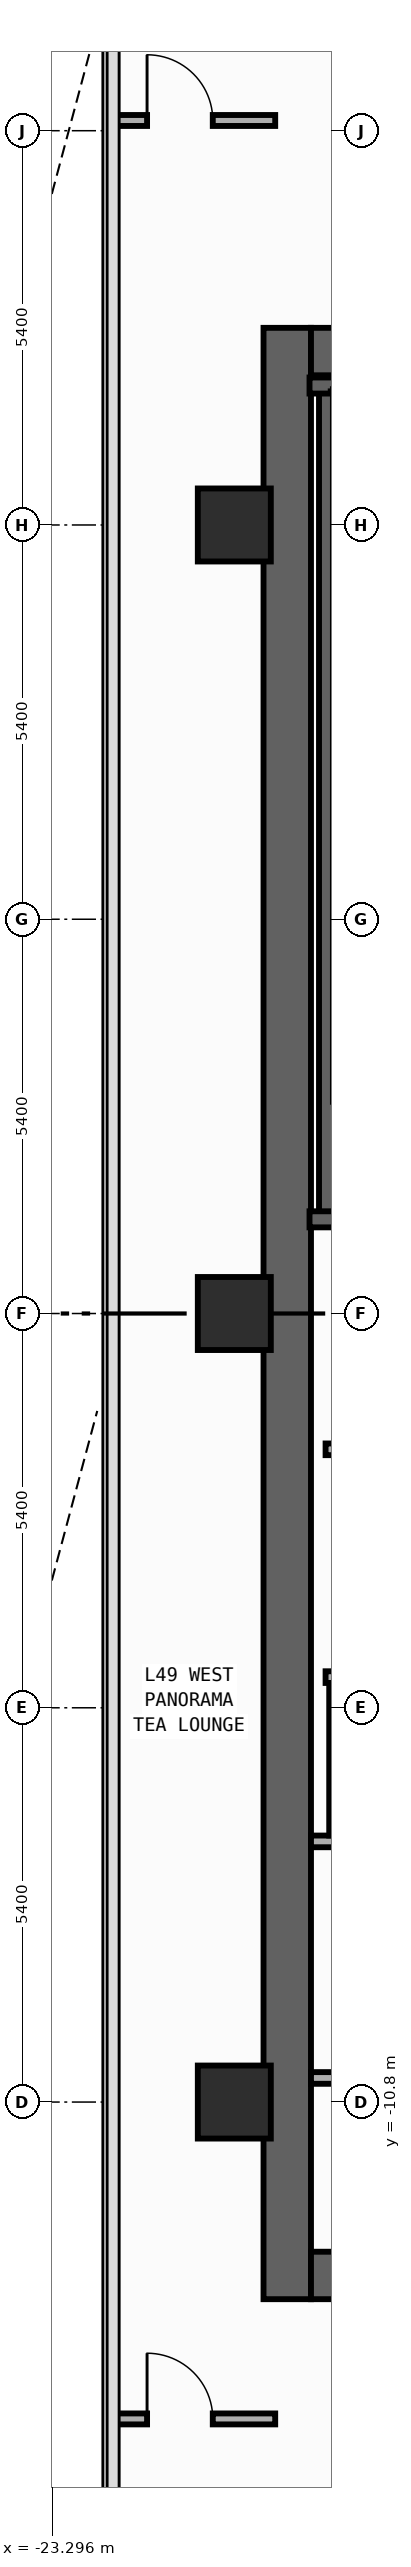
"""IFC4 building model, lengths in metres.
Left out: names, types, materials, properties, quantities, classifications, styles, units other than length and angle.
Written with IfcOpenShell. Run it as: python <this file> out.ifc"""

import sys

from ifc_helpers import new_model, si_unit, direction, frame, frame_2d, origin, origin_2d, place, context, subcontext, project, spatial, rectangle, extrude, element, fill, save


model = new_model("IFC4")
c1 = context("Model", 3, precision=1e-05, world=origin(), true_north=direction((0.0, 1.0)))
c2 = subcontext(c1, "Body", "Model", "MODEL_VIEW")
j1 = project(units=[si_unit("LENGTHUNIT", "METRE"), si_unit("PLANEANGLEUNIT", "RADIAN")], contexts=[c1])
p1 = place(None, origin())
s1 = spatial("IfcSite", under=j1, at=p1, CompositionType="ELEMENT")
p2 = place(p1, origin())
s2 = spatial("IfcBuilding", under=s1, at=p2, CompositionType="ELEMENT")
p3 = place(p2, frame((0.0, 0.0, 210.6)))
s3 = spatial("IfcBuildingStorey", under=s2, at=p3, CompositionType="ELEMENT", Elevation=210.6)
p4 = place(p3, frame((-20.075, -13.5, 0.0), z_axis=(0.0, 0.0, 1.0), x_axis=(0.0, 1.0, 0.0)))
e1 = element("IfcWall", 1, at=p4, inside=s3, PredefinedType="SHEAR", context=c2, shape_type="SweptSolid", body=[
    extrude(rectangle(XDim=27.0, YDim=0.65, at=frame_2d((13.5, 0.0))), origin(), (0.0, 0.0, 1.0), 3.45),
])
for number, where, z_axis, x_axis in (
    (2, (-19.75, -13.175, 0.0), (0.0, 0.0, 1.0), (1.0, 0.0, 0.0)),
    (3, (-19.75, 13.175, 0.0), (0.0, 0.0, 1.0), (1.0, 0.0, 0.0)),
):
    element("IfcWall", number, at=place(p3, frame(where, z_axis=z_axis, x_axis=x_axis)), inside=s3, PredefinedType="SHEAR", context=c2, shape_type="SweptSolid", body=[
        extrude(rectangle(XDim=7.1, YDim=0.65, at=frame_2d((3.55, 0.0))), origin(), (0.0, 0.0, 1.0), 3.45),
    ])
p5 = place(p3, frame((-19.53, 1.29, 0.0), z_axis=(0.0, 0.0, 1.0), x_axis=(0.0, 1.0, 0.0)))
e4 = element("IfcWall", 4, at=p5, inside=s3, PredefinedType="SHEAR", context=c2, shape_type="SweptSolid", body=[
    extrude(rectangle(XDim=11.42, YDim=0.22, at=frame_2d((5.71, 0.0))), origin(), (0.0, 0.0, 1.0), 3.45),
])
p6 = place(p3, frame((-19.77, 12.71, 0.0), z_axis=(0.0, 0.0, 1.0), x_axis=(1.0, 0.0, 0.0)))
e5 = element("IfcWall", 5, at=p6, inside=s3, PredefinedType="SHEAR", context=c2, shape_type="SweptSolid", body=[
    extrude(rectangle(XDim=4.065, YDim=0.22, at=frame_2d((2.032, 0.0))), origin(), (0.0, 0.0, 1.0), 3.45),
])
p7 = place(p3, frame((-19.77, 1.29, 0.0), z_axis=(0.0, 0.0, 1.0), x_axis=(1.0, 0.0, 0.0)))
e6 = element("IfcWall", 6, at=p7, inside=s3, PredefinedType="SHEAR", context=c2, shape_type="SweptSolid", body=[
    extrude(rectangle(XDim=4.065, YDim=0.22, at=frame_2d((2.032, 0.0))), origin(), (0.0, 0.0, 1.0), 3.45),
])
p8 = place(p7, frame((1.08, 0.0, 0.0)))
e7 = element("IfcOpeningElement", 7, at=p8, cuts=e6, PredefinedType="OPENING", context=c2, shape_type="SweptSolid", body=[
    extrude(rectangle(XDim=1.1, YDim=2.2, at=frame_2d((0.55, 1.1))), frame((0.0, 0.12, 0.0), z_axis=(0.0, -1.0, 0.0), x_axis=(1.0, 0.0, 0.0)), (0.0, 0.0, 1.0), 0.24),
])
for number, where, z_axis, x_axis in (
    (8, (-20.8, -10.8, 0.0), (0.0, 0.0, 1.0), (1.0, 0.0, 0.0)),
    (9, (-20.8, 0.0, 0.0), (0.0, 0.0, 1.0), (1.0, 0.0, 0.0)),
    (10, (-20.8, 10.8, 0.0), (0.0, 0.0, 1.0), (1.0, 0.0, 0.0)),
):
    element("IfcColumn", number, at=place(p3, frame(where, z_axis=z_axis, x_axis=x_axis)), inside=s3, PredefinedType="COLUMN", context=c2, shape_type="SweptSolid", body=[
        extrude(rectangle(XDim=1.0, YDim=1.0, at=origin_2d()), origin(), (0.0, 0.0, 1.0), 3.8),
    ])
p9 = place(p3, frame((-19.55, -1.86, 0.0), z_axis=(0.0, 0.0, 1.0), x_axis=(1.0, 0.0, 0.0)))
e11 = element("IfcWall", 11, at=p9, inside=s3, PredefinedType="STANDARD", context=c2, shape_type="SweptSolid", body=[
    extrude(rectangle(XDim=3.8, YDim=0.16, at=frame_2d((1.9, 0.0))), origin(), (0.0, 0.0, 1.0), 3.45),
])
p10 = place(p9, frame((1.18, 0.0, 0.0)))
e12 = element("IfcOpeningElement", 12, at=p10, cuts=e11, PredefinedType="OPENING", context=c2, shape_type="SweptSolid", body=[
    extrude(rectangle(XDim=1.15, YDim=2.2, at=frame_2d((0.575, 1.1))), frame((0.0, 0.09, 0.0), z_axis=(0.0, -1.0, 0.0), x_axis=(1.0, 0.0, 0.0)), (0.0, 0.0, 1.0), 0.18),
])
p11 = place(p3, frame((-19.55, -4.98, 0.0), z_axis=(0.0, 0.0, 1.0), x_axis=(1.0, 0.0, 0.0)))
e13 = element("IfcWall", 13, at=p11, inside=s3, PredefinedType="STANDARD", context=c2, shape_type="SweptSolid", body=[
    extrude(rectangle(XDim=3.8, YDim=0.16, at=frame_2d((1.9, 0.0))), origin(), (0.0, 0.0, 1.0), 3.45),
])
for number, where, z_axis, x_axis in (
    (14, (-19.75, -10.47, 0.0), (0.0, 0.0, 1.0), (1.0, 0.0, 0.0)),
    (15, (-19.75, -7.23, 0.0), (0.0, 0.0, 1.0), (1.0, 0.0, 0.0)),
):
    element("IfcWall", number, at=place(p3, frame(where, z_axis=z_axis, x_axis=x_axis)), inside=s3, PredefinedType="PARTITIONING", context=c2, shape_type="SweptSolid", body=[
        extrude(rectangle(XDim=2.44, YDim=0.16, at=frame_2d((1.22, 0.0))), origin(), (0.0, 0.0, 1.0), 3.45),
    ])
p12 = place(p3, frame((-22.455, 16.34, 0.0), z_axis=(0.0, 0.0, 1.0), x_axis=(1.0, 0.0, 0.0)))
e16 = element("IfcWall", 16, at=p12, inside=s3, PredefinedType="PARTITIONING", context=c2, shape_type="SweptSolid", body=[
    extrude(rectangle(XDim=2.215, YDim=0.15, at=frame_2d((1.107, 0.0))), origin(), (0.0, 0.0, 1.0), 3.45),
])
p13 = place(p12, frame((0.46, 0.0, 0.0)))
e17 = element("IfcOpeningElement", 17, at=p13, cuts=e16, PredefinedType="OPENING", context=c2, shape_type="SweptSolid", body=[
    extrude(rectangle(XDim=0.9, YDim=2.15, at=frame_2d((0.45, 1.075))), frame((0.0, 0.085, 0.0), z_axis=(0.0, -1.0, 0.0), x_axis=(1.0, 0.0, 0.0)), (0.0, 0.0, 1.0), 0.17),
])
p14 = place(p3, frame((-22.455, -15.14, 0.0), z_axis=(0.0, 0.0, 1.0), x_axis=(1.0, 0.0, 0.0)))
e18 = element("IfcWall", 18, at=p14, inside=s3, PredefinedType="PARTITIONING", context=c2, shape_type="SweptSolid", body=[
    extrude(rectangle(XDim=2.215, YDim=0.15, at=frame_2d((1.107, 0.0))), origin(), (0.0, 0.0, 1.0), 3.45),
])
p15 = place(p14, frame((0.46, 0.0, 0.0)))
e19 = element("IfcOpeningElement", 19, at=p15, cuts=e18, PredefinedType="OPENING", context=c2, shape_type="SweptSolid", body=[
    extrude(rectangle(XDim=0.9, YDim=2.15, at=frame_2d((0.45, 1.075))), frame((0.0, 0.085, 0.0), z_axis=(0.0, -1.0, 0.0), x_axis=(1.0, 0.0, 0.0)), (0.0, 0.0, 1.0), 0.17),
])
p16 = place(p3, frame((-19.45, -7.15, 0.0), z_axis=(0.0, 0.0, 1.0), x_axis=(0.0, 1.0, 0.0)))
e20 = element("IfcWall", 20, at=p16, inside=s3, PredefinedType="PARTITIONING", context=c2, shape_type="SweptSolid", body=[
    extrude(rectangle(XDim=2.09, YDim=0.1, at=frame_2d((1.045, 0.0))), origin(), (0.0, 0.0, 1.0), 3.45),
])
p17 = place(p13, origin())
e21 = element("IfcDoor", 21, at=p17, inside=s3, OperationType="SINGLE_SWING_LEFT", PredefinedType="DOOR", context=c2, shape_type="SweptSolid", body=[
    extrude(rectangle(XDim=0.9, YDim=2.15, at=frame_2d((0.45, 1.075))), frame((0.0, 0.025, 0.0), z_axis=(0.0, -1.0, 0.0), x_axis=(1.0, 0.0, 0.0)), (0.0, 0.0, 1.0), 0.05),
])
fill(e17, e21)
p18 = place(p15, origin())
e22 = element("IfcDoor", 22, at=p18, inside=s3, OperationType="SINGLE_SWING_LEFT", PredefinedType="DOOR", context=c2, shape_type="SweptSolid", body=[
    extrude(rectangle(XDim=0.9, YDim=2.15, at=frame_2d((0.45, 1.075))), frame((0.0, 0.025, 0.0), z_axis=(0.0, -1.0, 0.0), x_axis=(1.0, 0.0, 0.0)), (0.0, 0.0, 1.0), 0.05),
])
fill(e19, e22)
save(model, sys.argv[1])
